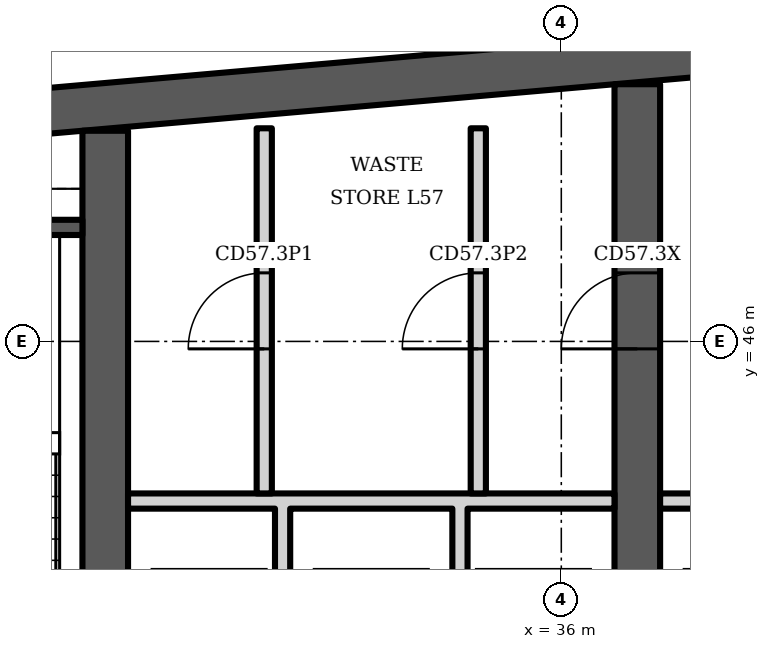
"""IFC4 building model, lengths in metres.
Left out: names, types, materials, properties, quantities, classifications, styles, units other than length and angle.
Written with IfcOpenShell. Run it as: python <this file> out.ifc"""

import sys

from ifc_helpers import new_model, si_unit, direction, frame, frame_2d, origin, place, context, subcontext, project, spatial, polyline, rectangle, outline, extrude, element, fill, save


model = new_model("IFC4")
c1 = context("Model", 3, precision=1e-05, world=origin(), true_north=direction((0.0, 1.0)))
c2 = subcontext(c1, "Body", "Model", "MODEL_VIEW")
j1 = project(units=[si_unit("LENGTHUNIT", "METRE"), si_unit("PLANEANGLEUNIT", "RADIAN")], contexts=[c1])
p1 = place(None, origin())
s1 = spatial("IfcSite", under=j1, at=p1, CompositionType="ELEMENT")
p2 = place(p1, origin())
s2 = spatial("IfcBuilding", under=s1, at=p2, CompositionType="ELEMENT")
p3 = place(p2, frame((0.0, 0.0, 228.7)))
s3 = spatial("IfcBuildingStorey", under=s2, at=p3, CompositionType="ELEMENT", Elevation=228.7)
p4 = place(p3, origin())
e1 = element("IfcWall", 1, at=p4, inside=s3, PredefinedType="SHEAR", context=c2, shape_type="SweptSolid", body=[
    extrude(outline(polyline([(23.0, 48.185), (40.5, 49.716), (58.0, 48.185), (58.0, 48.787), (40.5, 50.318), (23.0, 48.787), (23.0, 48.185)])), origin(), (0.0, 0.0, 1.0), 3.6),
])
p5 = place(p3, frame((30.0, 34.6, 0.0), z_axis=(0.0, 0.0, 1.0), x_axis=(0.0, 1.0, 0.0)))
e2 = element("IfcWall", 2, at=p5, inside=s3, PredefinedType="SHEAR", context=c2, shape_type="SweptSolid", body=[
    extrude(rectangle(XDim=14.171, YDim=0.6, at=frame_2d((7.085, 0.0))), origin(), (0.0, 0.0, 1.0), 3.6),
])
p6 = place(p5, frame((3.8, 0.0, 0.0)))
e3 = element("IfcOpeningElement", 3, at=p6, cuts=e2, PredefinedType="OPENING", context=c2, shape_type="SweptSolid", body=[
    extrude(rectangle(XDim=1.1, YDim=2.1, at=frame_2d((0.55, 1.05))), frame((0.0, 0.31, 0.0), z_axis=(0.0, -1.0, 0.0), x_axis=(1.0, 0.0, 0.0)), (0.0, 0.0, 1.0), 0.62),
])
p7 = place(p3, frame((37.0, 34.6, 0.0), z_axis=(0.0, 0.0, 1.0), x_axis=(0.0, 1.0, 0.0)))
e4 = element("IfcWall", 4, at=p7, inside=s3, PredefinedType="SHEAR", context=c2, shape_type="SweptSolid", body=[
    extrude(rectangle(XDim=14.784, YDim=0.6, at=frame_2d((7.392, 0.0))), origin(), (0.0, 0.0, 1.0), 3.6),
])
p8 = place(p7, frame((11.302, 0.0, 0.0)))
e5 = element("IfcOpeningElement", 5, at=p8, cuts=e4, PredefinedType="OPENING", context=c2, shape_type="SweptSolid", body=[
    extrude(rectangle(XDim=1.0, YDim=2.1, at=frame_2d((0.5, 1.05))), frame((0.0, 0.31, 0.0), z_axis=(0.0, -1.0, 0.0), x_axis=(1.0, 0.0, 0.0)), (0.0, 0.0, 1.0), 0.62),
])
p9 = place(p7, frame((3.8, 0.0, 0.0)))
e6 = element("IfcOpeningElement", 6, at=p9, cuts=e4, PredefinedType="OPENING", context=c2, shape_type="SweptSolid", body=[
    extrude(rectangle(XDim=1.1, YDim=2.1, at=frame_2d((0.55, 1.05))), frame((0.0, 0.31, 0.0), z_axis=(0.0, -1.0, 0.0), x_axis=(1.0, 0.0, 0.0)), (0.0, 0.0, 1.0), 0.62),
])
p10 = place(p3, frame((25.75, 47.5, 0.0), z_axis=(0.0, 0.0, 1.0), x_axis=(1.0, 0.0, 0.0)))
e7 = element("IfcWall", 7, at=p10, inside=s3, PredefinedType="SHEAR", context=c2, shape_type="SweptSolid", body=[
    extrude(rectangle(XDim=3.95, YDim=0.2, at=frame_2d((1.975, 0.0))), origin(), (0.0, 0.0, 1.0), 3.2),
])
p11 = place(p3, frame((0.0, 0.0, -0.0)))
e8 = element("IfcWall", 8, at=p11, inside=s3, PredefinedType="PARTITIONING", context=c2, shape_type="SweptSolid", body=[
    extrude(outline(polyline([(32.433, 40.8), (32.233, 40.8), (32.233, 43.8), (30.3, 43.8), (30.3, 44.0), (36.7, 44.0), (36.7, 43.8), (34.767, 43.8), (34.767, 40.8), (34.567, 40.8), (34.567, 43.8), (32.433, 43.8), (32.433, 40.8)])), origin(), (0.0, 0.0, 1.0), 3.2),
])
p12 = place(p3, frame((32.092, 44.0, 0.0), z_axis=(0.0, 0.0, 1.0), x_axis=(0.0, 1.0, 0.0)))
e9 = element("IfcWall", 9, at=p12, inside=s3, PredefinedType="PARTITIONING", context=c2, shape_type="SweptSolid", body=[
    extrude(rectangle(XDim=4.804, YDim=0.2, at=frame_2d((2.402, 0.0))), origin(), (0.0, 0.0, 1.0), 3.2),
])
p13 = place(p12, frame((1.902, 0.0, 0.0)))
e10 = element("IfcOpeningElement", 10, at=p13, cuts=e9, PredefinedType="OPENING", context=c2, shape_type="SweptSolid", body=[
    extrude(rectangle(XDim=1.0, YDim=2.1, at=frame_2d((0.5, 1.05))), frame((0.0, 0.11, 0.0), z_axis=(0.0, -1.0, 0.0), x_axis=(1.0, 0.0, 0.0)), (0.0, 0.0, 1.0), 0.22),
])
p14 = place(p3, frame((34.908, 44.0, 0.0), z_axis=(0.0, 0.0, 1.0), x_axis=(0.0, 1.0, 0.0)))
e11 = element("IfcWall", 11, at=p14, inside=s3, PredefinedType="PARTITIONING", context=c2, shape_type="SweptSolid", body=[
    extrude(rectangle(XDim=4.804, YDim=0.2, at=frame_2d((2.402, 0.0))), origin(), (0.0, 0.0, 1.0), 3.2),
])
p15 = place(p14, frame((1.902, 0.0, 0.0)))
e12 = element("IfcOpeningElement", 12, at=p15, cuts=e11, PredefinedType="OPENING", context=c2, shape_type="SweptSolid", body=[
    extrude(rectangle(XDim=1.0, YDim=2.1, at=frame_2d((0.5, 1.05))), frame((0.0, 0.11, 0.0), z_axis=(0.0, -1.0, 0.0), x_axis=(1.0, 0.0, 0.0)), (0.0, 0.0, 1.0), 0.22),
])
p16 = place(p3, frame((0.0, 0.0, -0.0)))
e13 = element("IfcWall", 13, at=p16, inside=s3, PredefinedType="PARTITIONING", context=c2, shape_type="SweptSolid", body=[
    extrude(outline(polyline([(39.433, 40.8), (39.233, 40.8), (39.233, 43.8), (37.3, 43.8), (37.3, 44.0), (43.7, 44.0), (43.7, 43.8), (41.767, 43.8), (41.767, 40.8), (41.567, 40.8), (41.567, 43.8), (39.433, 43.8), (39.433, 40.8)])), origin(), (0.0, 0.0, 1.0), 3.2),
])
p17 = place(p13, origin())
e14 = element("IfcDoor", 14, at=p17, inside=s3, OperationType="SINGLE_SWING_LEFT", PredefinedType="DOOR", context=c2, shape_type="SweptSolid", body=[
    extrude(rectangle(XDim=1.0, YDim=2.1, at=frame_2d((0.5, 1.05))), frame((0.0, 0.025, 0.0), z_axis=(0.0, -1.0, 0.0), x_axis=(1.0, 0.0, 0.0)), (0.0, 0.0, 1.0), 0.05),
])
fill(e10, e14)
p18 = place(p15, origin())
e15 = element("IfcDoor", 15, at=p18, inside=s3, OperationType="SINGLE_SWING_LEFT", PredefinedType="DOOR", context=c2, shape_type="SweptSolid", body=[
    extrude(rectangle(XDim=1.0, YDim=2.1, at=frame_2d((0.5, 1.05))), frame((0.0, 0.025, 0.0), z_axis=(0.0, -1.0, 0.0), x_axis=(1.0, 0.0, 0.0)), (0.0, 0.0, 1.0), 0.05),
])
fill(e12, e15)
p19 = place(p8, origin())
e16 = element("IfcDoor", 16, at=p19, inside=s3, OperationType="SINGLE_SWING_LEFT", PredefinedType="DOOR", context=c2, shape_type="SweptSolid", body=[
    extrude(rectangle(XDim=1.0, YDim=2.1, at=frame_2d((0.5, 1.05))), frame((0.0, 0.025, 0.0), z_axis=(0.0, -1.0, 0.0), x_axis=(1.0, 0.0, 0.0)), (0.0, 0.0, 1.0), 0.05),
])
fill(e5, e16)
save(model, sys.argv[1])
